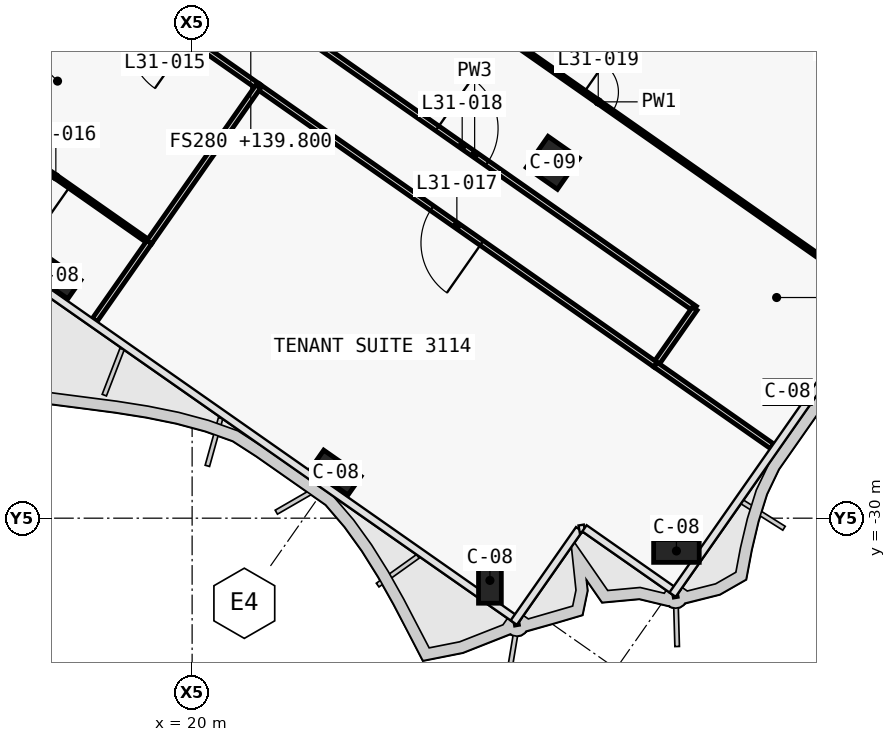
"""IFC4 building model, lengths in metres.
Left out: names, types, materials, properties, quantities, classifications, styles, units other than length and angle.
Written with IfcOpenShell. Run it as: python <this file> out.ifc"""

import sys

from ifc_helpers import new_model, si_unit, direction, frame, frame_2d, origin, origin_2d, place, context, subcontext, project, spatial, rectangle, extrude, clip, halfspace, element, fill, save


model = new_model("IFC4")
c1 = context("Model", 3, precision=1e-05, world=origin(), true_north=direction((0.0, 1.0)))
c2 = subcontext(c1, "Body", "Model", "MODEL_VIEW")
j1 = project(units=[si_unit("LENGTHUNIT", "METRE"), si_unit("PLANEANGLEUNIT", "RADIAN")], contexts=[c1])
p1 = place(None, origin())
s1 = spatial("IfcSite", under=j1, at=p1, CompositionType="ELEMENT")
p2 = place(p1, origin())
s2 = spatial("IfcBuilding", under=s1, at=p2, CompositionType="ELEMENT")
p3 = place(p2, frame((0.0, 0.0, 139.8)))
s3 = spatial("IfcBuildingStorey", under=s2, at=p3, CompositionType="ELEMENT", Elevation=139.8)
for number, where, z_axis, x_axis in (
    (1, (16.41, -23.637, 0.0), (0.0, 0.0, 1.0), (0.819, -0.574, 0.0)),
    (2, (23.782, -28.799, 0.0), (0.0, 0.0, 1.0), (0.819, -0.574, 0.0)),
):
    element("IfcColumn", number, at=place(p3, frame(where, z_axis=z_axis, x_axis=x_axis)), inside=s3, PredefinedType="COLUMN", context=c2, shape_type="SweptSolid", body=[
        extrude(rectangle(XDim=1.2, YDim=0.6, at=origin_2d()), origin(), (0.0, 0.0, 1.0), 3.9),
    ])
p4 = place(p3, frame((28.042, -31.782, 0.0), z_axis=(-0.477746603964, 0.334466003579, 0.812336552699), x_axis=(0.665463644855, -0.465884977465, 0.583188927492)))
e3 = element("IfcColumn", 3, at=p4, inside=s3, PredefinedType="COLUMN", context=c2, shape_type="Clipping", body=[
    clip(clip(extrude(rectangle(XDim=1.2, YDim=0.6, at=origin_2d()), origin(), (0.0, 0.0, 1.0), 4.801), halfspace(frame((0.0, 0.0, 0.431), z_axis=(0.0, 0.0, 1.0), x_axis=(1.0, 0.0, 0.0)), True)), halfspace(frame((0.0, 0.0, 4.37), z_axis=(0.0, 0.0, 1.0), x_axis=(1.0, 0.0, 0.0)), False)),
])
p5 = place(p3, frame((37.85, -17.774, 0.0), z_axis=(-0.477736700756, 0.334521041728, 0.812319713778), x_axis=(0.665409295045, -0.465933243566, 0.583212382077)))
e4 = element("IfcColumn", 4, at=p5, inside=s3, PredefinedType="COLUMN", context=c2, shape_type="Clipping", body=[
    clip(clip(extrude(rectangle(XDim=1.2, YDim=0.6, at=origin_2d()), origin(), (0.0, 0.0, 1.0), 4.801), halfspace(frame((0.0, 0.0, 0.431), z_axis=(0.0, 0.0, 1.0), x_axis=(1.0, 0.0, 0.0)), True)), halfspace(frame((0.0, 0.0, 4.37), z_axis=(0.0, 0.0, 1.0), x_axis=(1.0, 0.0, 0.0)), False)),
])
p6 = place(p3, frame((32.847, -30.935, 0.0), z_axis=(-0.477726386634, 0.334536966807, 0.812319221337), x_axis=(0.573610203854, 0.819128398991, 0.0)))
e5 = element("IfcColumn", 5, at=p6, inside=s3, PredefinedType="COLUMN", context=c2, shape_type="Clipping", body=[
    clip(clip(extrude(rectangle(XDim=1.2, YDim=0.6, at=origin_2d()), origin(), (0.0, 0.0, 1.0), 4.801), halfspace(frame((0.0, 0.0, 0.215), z_axis=(0.0, 0.0, 1.0), x_axis=(1.0, 0.0, 0.0)), True)), halfspace(frame((0.0, 0.0, 4.585), z_axis=(0.0, 0.0, 1.0), x_axis=(1.0, 0.0, 0.0)), False)),
])
p7 = place(p3, frame((35.772, -26.757, 0.0), z_axis=(-0.477760573022, 0.334577651055, 0.812282358715), x_axis=(0.573629466203, 0.819114909829, 0.0)))
e6 = element("IfcColumn", 6, at=p7, inside=s3, PredefinedType="COLUMN", context=c2, shape_type="Clipping", body=[
    clip(clip(extrude(rectangle(XDim=1.2, YDim=0.6, at=origin_2d()), origin(), (0.0, 0.0, 1.0), 4.801), halfspace(frame((0.0, 0.0, 0.215), z_axis=(0.0, 0.0, 1.0), x_axis=(1.0, 0.0, 0.0)), True)), halfspace(frame((0.0, 0.0, 4.585), z_axis=(0.0, 0.0, 1.0), x_axis=(1.0, 0.0, 0.0)), False)),
])
p8 = place(p3, frame((38.698, -22.579, 0.0), z_axis=(-0.477769502493, 0.334528037995, 0.812297540488), x_axis=(0.573565197047, 0.819159914019, 0.0)))
e7 = element("IfcColumn", 7, at=p8, inside=s3, PredefinedType="COLUMN", context=c2, shape_type="Clipping", body=[
    clip(clip(extrude(rectangle(XDim=1.2, YDim=0.6, at=origin_2d()), origin(), (0.0, 0.0, 1.0), 4.801), halfspace(frame((0.0, 0.0, 0.215), z_axis=(0.0, 0.0, 1.0), x_axis=(1.0, 0.0, 0.0)), True)), halfspace(frame((0.0, 0.0, 4.585), z_axis=(0.0, 0.0, 1.0), x_axis=(1.0, 0.0, 0.0)), False)),
])
p9 = place(p3, frame((29.49, -20.649, 0.0), z_axis=(0.0, 0.0, 1.0), x_axis=(0.819152044289, -0.573576436351, 0.0)))
e8 = element("IfcColumn", 8, at=p9, inside=s3, PredefinedType="COLUMN", context=c2, shape_type="SweptSolid", body=[
    extrude(rectangle(XDim=1.0, YDim=1.0, at=origin_2d()), origin(), (0.0, 0.0, 1.0), 3.9),
])
p10 = place(p3, frame((21.642, -16.375, 0.0), z_axis=(0.0, 0.0, 1.0), x_axis=(0.819150808859, -0.573578200724, 0.0)))
e9 = element("IfcWall", 9, at=p10, inside=s3, PredefinedType="PARTITIONING", context=c2, shape_type="SweptSolid", body=[
    extrude(rectangle(XDim=14.142, YDim=0.15, at=frame_2d((7.071, 0.0))), origin(), (0.0, 0.0, 1.0), 3.0),
])
p11 = place(p10, frame((5.871, 0.0, 0.0)))
e10 = element("IfcOpeningElement", 10, at=p11, cuts=e9, PredefinedType="OPENING", context=c2, shape_type="SweptSolid", body=[
    extrude(rectangle(XDim=1.6, YDim=2.1, at=frame_2d((0.8, 1.05))), frame((0.0, 0.085, 0.0), z_axis=(0.0, -1.0, 0.0), x_axis=(1.0, 0.0, 0.0)), (0.0, 0.0, 1.0), 0.17),
])
p12 = place(p3, frame((33.226, -24.486, 0.0), z_axis=(0.0, 0.0, 1.0), x_axis=(-0.573553363558, -0.819168199548, 0.0)))
e11 = element("IfcWall", 11, at=p12, inside=s3, PredefinedType="PARTITIONING", context=c2, shape_type="SweptSolid", body=[
    extrude(rectangle(XDim=1.8, YDim=0.15, at=frame_2d((0.9, 0.0))), origin(), (0.0, 0.0, 1.0), 3.0),
])
p13 = place(p3, frame((21.741, -18.642, 0.0), z_axis=(0.0, 0.0, 1.0), x_axis=(-0.819165052243, 0.573557858619, 0.0)))
e12 = element("IfcWall", 12, at=p13, inside=s3, PredefinedType="PARTITIONING", context=c2, shape_type="SweptSolid", body=[
    extrude(rectangle(XDim=6.004, YDim=0.15, at=frame_2d((3.002, 0.0))), origin(), (0.0, 0.0, 1.0), 3.0),
])
p14 = place(p13, frame((2.202, 0.0, 0.0)))
e13 = element("IfcOpeningElement", 13, at=p14, cuts=e12, PredefinedType="OPENING", context=c2, shape_type="SweptSolid", body=[
    extrude(rectangle(XDim=1.6, YDim=2.1, at=frame_2d((0.8, 1.05))), frame((0.0, 0.085, 0.0), z_axis=(0.0, -1.0, 0.0), x_axis=(1.0, 0.0, 0.0)), (0.0, 0.0, 1.0), 0.17),
])
p15 = place(p3, frame((32.194, -25.961, 0.0), z_axis=(0.0, 0.0, 1.0), x_axis=(-0.819143848461, 0.573588141028, 0.0)))
e14 = element("IfcWall", 14, at=p15, inside=s3, PredefinedType="PARTITIONING", context=c2, shape_type="SweptSolid", body=[
    extrude(rectangle(XDim=12.764, YDim=0.15, at=frame_2d((6.382, 0.0))), origin(), (0.0, 0.0, 1.0), 3.0),
])
p16 = place(p15, frame((5.582, 0.0, 0.0)))
e15 = element("IfcOpeningElement", 15, at=p16, cuts=e14, PredefinedType="OPENING", context=c2, shape_type="SweptSolid", body=[
    extrude(rectangle(XDim=1.6, YDim=2.1, at=frame_2d((0.8, 1.05))), frame((0.0, 0.085, 0.0), z_axis=(0.0, -1.0, 0.0), x_axis=(1.0, 0.0, 0.0)), (0.0, 0.0, 1.0), 0.17),
])
p17 = place(p3, frame((23.363, -13.916, 0.0), z_axis=(0.0, 0.0, 1.0), x_axis=(0.819151086028, -0.573577804887, 0.0)))
e16 = element("IfcWall", 16, at=p17, inside=s3, PredefinedType="PARTITIONING", context=c2, shape_type="SweptSolid", body=[
    extrude(rectangle(XDim=17.88, YDim=0.1, at=frame_2d((8.94, 0.0))), origin(), (0.0, 0.0, 1.0), 2.9),
])
p18 = place(p17, frame((8.49, 0.0, 0.0)))
e17 = element("IfcOpeningElement", 17, at=p18, cuts=e16, PredefinedType="OPENING", context=c2, shape_type="SweptSolid", body=[
    extrude(rectangle(XDim=0.9, YDim=2.1, at=frame_2d((0.45, 1.05))), frame((0.0, 0.06, 0.0), z_axis=(0.0, -1.0, 0.0), x_axis=(1.0, 0.0, 0.0)), (0.0, 0.0, 1.0), 0.12),
])
p19 = place(p3, frame((35.256, -28.104, 0.0), z_axis=(0.0, 0.0, 1.0), x_axis=(-0.819213508421, 0.573488646462, 0.0)))
e18 = element("IfcWall", 18, at=p19, inside=s3, PredefinedType="PARTITIONING", context=c2, shape_type="SweptSolid", body=[
    extrude(rectangle(XDim=3.738, YDim=0.15, at=frame_2d((1.869, 0.0))), origin(), (0.0, 0.0, 1.0), 2.9),
])
p20 = place(p3, frame((16.825, -15.199, 0.0), z_axis=(0.0, 0.0, 1.0), x_axis=(-0.573613022702, -0.819126425033, 0.0)))
e19 = element("IfcWall", 19, at=p20, inside=s3, PredefinedType="PARTITIONING", context=c2, shape_type="SweptSolid", body=[
    extrude(rectangle(XDim=5.002, YDim=0.15, at=frame_2d((2.501, 0.0))), origin(), (0.0, 0.0, 1.0), 3.62),
])
p21 = place(p3, frame((18.871, -22.737, 0.0), z_axis=(0.0, 0.0, 1.0), x_axis=(-0.819149710902, 0.573579768758, 0.0)))
e20 = element("IfcWall", 20, at=p21, inside=s3, PredefinedType="PARTITIONING", context=c2, shape_type="SweptSolid", body=[
    extrude(rectangle(XDim=6.0, YDim=0.1, at=frame_2d((3.0, 0.0))), origin(), (0.0, 0.0, 1.0), 3.0),
])
p22 = place(p21, frame((2.55, 0.0, 0.0)))
e21 = element("IfcOpeningElement", 21, at=p22, cuts=e20, PredefinedType="OPENING", context=c2, shape_type="SweptSolid", body=[
    extrude(rectangle(XDim=0.9, YDim=2.1, at=frame_2d((0.45, 1.05))), frame((0.0, 0.06, 0.0), z_axis=(0.0, -1.0, 0.0), x_axis=(1.0, 0.0, 0.0)), (0.0, 0.0, 1.0), 0.12),
])
p23 = place(p3, frame((18.871, -22.737, 0.0), z_axis=(0.0, 0.0, 1.0), x_axis=(-0.573560689761, -0.819163069945, 0.0)))
e22 = element("IfcWall", 22, at=p23, inside=s3, PredefinedType="PARTITIONING", context=c2, shape_type="SweptSolid", body=[
    extrude(rectangle(XDim=2.499, YDim=0.15, at=frame_2d((1.25, 0.0))), origin(), (0.0, 0.0, 1.0), 2.9),
])
p24 = place(p3, frame((21.74, -18.641, 0.0), z_axis=(0.0, 0.0, 1.0), x_axis=(-0.573586866468, -0.819144740944, 0.0)))
e23 = element("IfcWall", 23, at=p24, inside=s3, PredefinedType="PARTITIONING", context=c2, shape_type="SweptSolid", body=[
    extrude(rectangle(XDim=5.0, YDim=0.15, at=frame_2d((2.5, 0.0))), origin(), (0.0, 0.0, 1.0), 3.62),
])
p25 = place(p22, origin())
e24 = element("IfcDoor", 24, at=p25, inside=s3, OperationType="SINGLE_SWING_RIGHT", PredefinedType="DOOR", context=c2, shape_type="SweptSolid", body=[
    extrude(rectangle(XDim=0.9, YDim=2.1, at=frame_2d((0.45, 1.05))), frame((0.0, 0.025, 0.0), z_axis=(0.0, -1.0, 0.0), x_axis=(1.0, 0.0, 0.0)), (0.0, 0.0, 1.0), 0.05),
])
fill(e21, e24)
p26 = place(p16, origin())
e25 = element("IfcDoor", 25, at=p26, inside=s3, OperationType="DOUBLE_DOOR_SINGLE_SWING", PredefinedType="DOOR", context=c2, shape_type="SweptSolid", body=[
    extrude(rectangle(XDim=1.6, YDim=2.1, at=frame_2d((0.8, 1.05))), frame((0.0, 0.025, 0.0), z_axis=(0.0, -1.0, 0.0), x_axis=(1.0, 0.0, 0.0)), (0.0, 0.0, 1.0), 0.05),
])
fill(e15, e25)
p27 = place(p11, origin())
e26 = element("IfcDoor", 26, at=p27, inside=s3, OperationType="DOUBLE_DOOR_SINGLE_SWING", PredefinedType="DOOR", context=c2, shape_type="SweptSolid", body=[
    extrude(rectangle(XDim=1.6, YDim=2.1, at=frame_2d((0.8, 1.05))), frame((0.0, 0.025, 0.0), z_axis=(0.0, -1.0, 0.0), x_axis=(1.0, 0.0, 0.0)), (0.0, 0.0, 1.0), 0.05),
])
fill(e10, e26)
p28 = place(p18, origin())
e27 = element("IfcDoor", 27, at=p28, inside=s3, OperationType="SINGLE_SWING_RIGHT", PredefinedType="DOOR", context=c2, shape_type="SweptSolid", body=[
    extrude(rectangle(XDim=0.9, YDim=2.1, at=frame_2d((0.45, 1.05))), frame((0.0, 0.025, 0.0), z_axis=(0.0, -1.0, 0.0), x_axis=(1.0, 0.0, 0.0)), (0.0, 0.0, 1.0), 0.05),
])
fill(e17, e27)
save(model, sys.argv[1])
